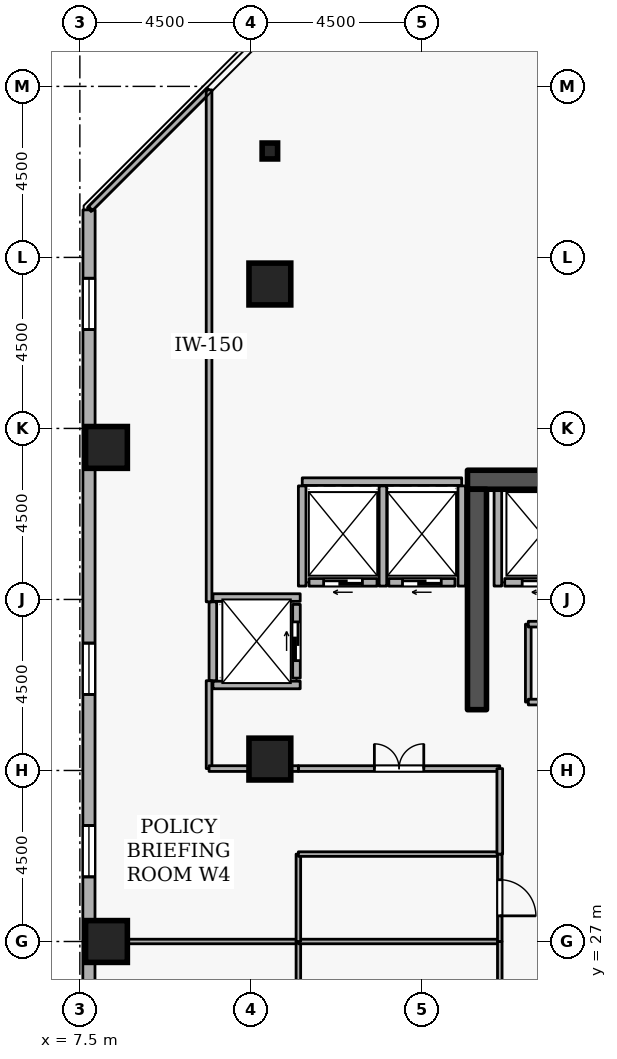
"""IFC4 building model, lengths in metres.
Left out: names, types, materials, properties, quantities, classifications, styles, units other than length and angle.
Written with IfcOpenShell. Run it as: python <this file> out.ifc"""

import sys

from ifc_helpers import new_model, si_unit, direction, frame, frame_2d, origin, origin_2d, place, context, subcontext, project, spatial, rectangle, i_section, extrude, element, fill, save


model = new_model("IFC4")
c1 = context("Model", 3, precision=1e-05, world=origin(), true_north=direction((0.0, 1.0)))
c2 = subcontext(c1, "Body", "Model", "MODEL_VIEW")
j1 = project(units=[si_unit("LENGTHUNIT", "METRE"), si_unit("PLANEANGLEUNIT", "RADIAN")], contexts=[c1])
p1 = place(None, origin())
s1 = spatial("IfcSite", under=j1, at=p1, CompositionType="ELEMENT")
p2 = place(p1, origin())
s2 = spatial("IfcBuilding", under=s1, at=p2, CompositionType="ELEMENT")
p3 = place(p2, frame((0.0, 0.0, 196.5)))
s3 = spatial("IfcBuildingStorey", under=s2, at=p3, CompositionType="ELEMENT", Elevation=196.5)
p4 = place(p3, frame((17.7, 39.15, 0.0), z_axis=(0.0, 0.0, 1.0), x_axis=(1.0, 0.0, 0.0)))
e1 = element("IfcWall", 1, at=p4, inside=s3, PredefinedType="SHEAR", context=c2, shape_type="SweptSolid", body=[
    extrude(rectangle(XDim=15.6, YDim=0.5, at=frame_2d((7.8, 0.0))), origin(), (0.0, 0.0, 1.0), 3.6),
])
p5 = place(p3, frame((17.95, 33.1, 0.0), z_axis=(0.0, 0.0, 1.0), x_axis=(0.0, 1.0, 0.0)))
e2 = element("IfcWall", 2, at=p5, inside=s3, PredefinedType="SHEAR", context=c2, shape_type="SweptSolid", body=[
    extrude(rectangle(XDim=5.8, YDim=0.5, at=frame_2d((2.9, 0.0))), origin(), (0.0, 0.0, 1.0), 3.6),
])
for number, where, z_axis, x_axis in (
    (3, (12.5, 44.3, 0.0), (0.0, 0.0, 1.0), (1.0, 0.0, 0.0)),
    (4, (8.2, 27.0, 0.0), (0.0, 0.0, 1.0), (1.0, 0.0, 0.0)),
    (5, (8.2, 40.0, 0.0), (0.0, 0.0, 1.0), (1.0, 0.0, 0.0)),
    (6, (12.5, 31.8, 0.0), (0.0, 0.0, 1.0), (1.0, 0.0, 0.0)),
):
    element("IfcColumn", number, at=place(p3, frame(where, z_axis=z_axis, x_axis=x_axis)), inside=s3, PredefinedType="COLUMN", context=c2, shape_type="SweptSolid", body=[
        extrude(rectangle(XDim=1.1, YDim=1.1, at=origin_2d()), origin(), (0.0, 0.0, 1.0), 3.6),
    ])
p6 = place(p3, frame((12.5, 47.8, 0.0), z_axis=(0.0, 0.0, 1.0), x_axis=(1.0, 0.0, 0.0)))
e7 = element("IfcColumn", 7, at=p6, inside=s3, PredefinedType="COLUMN", context=c2, shape_type="SweptSolid", body=[
    extrude(i_section(OverallWidth=0.407, OverallDepth=0.419, WebThickness=0.031, FlangeThickness=0.049, FilletRadius=0.015, at=origin_2d()), origin(), (0.0, 0.0, 1.0), 3.6),
])
p7 = place(p3, frame((7.742, 46.251, 0.0), z_axis=(0.0, 0.0, 1.0), x_axis=(-0.000184351399, -0.999999983007, 0.0)))
e8 = element("IfcWall", 8, at=p7, inside=s3, PredefinedType="STANDARD", context=c2, shape_type="SweptSolid", body=[
    extrude(rectangle(XDim=34.432, YDim=0.32, at=frame_2d((17.216, 0.0))), origin(), (0.0, 0.0, 1.0), 2.22),
])
p8 = place(p7, frame((1.8, 0.0, 0.72)))
e9 = element("IfcOpeningElement", 9, at=p8, cuts=e8, PredefinedType="OPENING", context=c2, shape_type="SweptSolid", body=[
    extrude(rectangle(XDim=1.35, YDim=1.05, at=frame_2d((0.675, 0.525))), frame((0.0, 0.17, 0.0), z_axis=(0.0, -1.0, 0.0), x_axis=(1.0, 0.0, 0.0)), (0.0, 0.0, 1.0), 0.34),
])
p9 = place(p7, frame((11.4, 0.0, 0.72)))
e10 = element("IfcOpeningElement", 10, at=p9, cuts=e8, PredefinedType="OPENING", context=c2, shape_type="SweptSolid", body=[
    extrude(rectangle(XDim=1.35, YDim=1.05, at=frame_2d((0.675, 0.525))), frame((0.0, 0.17, 0.0), z_axis=(0.0, -1.0, 0.0), x_axis=(1.0, 0.0, 0.0)), (0.0, 0.0, 1.0), 0.34),
])
p10 = place(p7, frame((16.2, 0.0, 0.72)))
e11 = element("IfcOpeningElement", 11, at=p10, cuts=e8, PredefinedType="OPENING", context=c2, shape_type="SweptSolid", body=[
    extrude(rectangle(XDim=1.35, YDim=1.05, at=frame_2d((0.675, 0.525))), frame((0.0, 0.17, 0.0), z_axis=(0.0, -1.0, 0.0), x_axis=(1.0, 0.0, 0.0)), (0.0, 0.0, 1.0), 0.34),
])
p11 = place(p7, frame((21.0, 0.0, 0.72)))
e12 = element("IfcOpeningElement", 12, at=p11, cuts=e8, PredefinedType="OPENING", context=c2, shape_type="SweptSolid", body=[
    extrude(rectangle(XDim=1.35, YDim=1.05, at=frame_2d((0.675, 0.525))), frame((0.0, 0.17, 0.0), z_axis=(0.0, -1.0, 0.0), x_axis=(1.0, 0.0, 0.0)), (0.0, 0.0, 1.0), 0.34),
])
p12 = place(p7, frame((25.8, 0.0, 0.72)))
e13 = element("IfcOpeningElement", 13, at=p12, cuts=e8, PredefinedType="OPENING", context=c2, shape_type="SweptSolid", body=[
    extrude(rectangle(XDim=1.35, YDim=1.05, at=frame_2d((0.675, 0.525))), frame((0.0, 0.17, 0.0), z_axis=(0.0, -1.0, 0.0), x_axis=(1.0, 0.0, 0.0)), (0.0, 0.0, 1.0), 0.34),
])
p13 = place(p3, frame((20.62, 36.45, 0.0), z_axis=(0.0, 0.0, 1.0), x_axis=(-1.0, 0.0, 0.0)))
e14 = element("IfcWall", 14, at=p13, inside=s3, PredefinedType="STANDARD", context=c2, shape_type="SweptSolid", body=[
    extrude(rectangle(XDim=1.94, YDim=0.2, at=frame_2d((0.97, 0.0))), origin(), (0.0, 0.0, 1.0), 3.32),
])
p14 = place(p13, frame((0.46, 0.0, 0.0)))
e15 = element("IfcOpeningElement", 15, at=p14, cuts=e14, PredefinedType="OPENING", context=c2, shape_type="SweptSolid", body=[
    extrude(rectangle(XDim=1.02, YDim=2.06, at=frame_2d((0.51, 1.03))), frame((0.0, 0.11, 0.0), z_axis=(0.0, -1.0, 0.0), x_axis=(1.0, 0.0, 0.0)), (0.0, 0.0, 1.0), 0.22),
])
p15 = place(p3, frame((17.37, 36.45, 0.0), z_axis=(0.0, 0.0, 1.0), x_axis=(-1.0, 0.0, 0.0)))
e16 = element("IfcWall", 16, at=p15, inside=s3, PredefinedType="STANDARD", context=c2, shape_type="SweptSolid", body=[
    extrude(rectangle(XDim=1.74, YDim=0.2, at=frame_2d((0.87, 0.0))), origin(), (0.0, 0.0, 1.0), 3.32),
])
p16 = place(p15, frame((0.36, 0.0, 0.0)))
e17 = element("IfcOpeningElement", 17, at=p16, cuts=e16, PredefinedType="OPENING", context=c2, shape_type="SweptSolid", body=[
    extrude(rectangle(XDim=1.02, YDim=2.06, at=frame_2d((0.51, 1.03))), frame((0.0, 0.11, 0.0), z_axis=(0.0, -1.0, 0.0), x_axis=(1.0, 0.0, 0.0)), (0.0, 0.0, 1.0), 0.22),
])
p17 = place(p3, frame((15.32, 36.45, 0.0), z_axis=(0.0, 0.0, 1.0), x_axis=(-1.0, 0.0, 0.0)))
e18 = element("IfcWall", 18, at=p17, inside=s3, PredefinedType="STANDARD", context=c2, shape_type="SweptSolid", body=[
    extrude(rectangle(XDim=1.79, YDim=0.2, at=frame_2d((0.895, 0.0))), origin(), (0.0, 0.0, 1.0), 3.32),
])
p18 = place(p17, frame((0.385, 0.0, 0.0)))
e19 = element("IfcOpeningElement", 19, at=p18, cuts=e18, PredefinedType="OPENING", context=c2, shape_type="SweptSolid", body=[
    extrude(rectangle(XDim=1.02, YDim=2.06, at=frame_2d((0.51, 1.03))), frame((0.0, 0.11, 0.0), z_axis=(0.0, -1.0, 0.0), x_axis=(1.0, 0.0, 0.0)), (0.0, 0.0, 1.0), 0.22),
])
p19 = place(p3, frame((13.2, 33.93, 0.0), z_axis=(0.0, 0.0, 1.0), x_axis=(0.0, 1.0, 0.0)))
e20 = element("IfcWall", 20, at=p19, inside=s3, PredefinedType="STANDARD", context=c2, shape_type="SweptSolid", body=[
    extrude(rectangle(XDim=1.94, YDim=0.2, at=frame_2d((0.97, 0.0))), origin(), (0.0, 0.0, 1.0), 3.32),
])
p20 = place(p19, frame((0.46, 0.0, 0.0)))
e21 = element("IfcOpeningElement", 21, at=p20, cuts=e20, PredefinedType="OPENING", context=c2, shape_type="SweptSolid", body=[
    extrude(rectangle(XDim=1.02, YDim=2.06, at=frame_2d((0.51, 1.03))), frame((0.0, 0.11, 0.0), z_axis=(0.0, -1.0, 0.0), x_axis=(1.0, 0.0, 0.0)), (0.0, 0.0, 1.0), 0.22),
])
p21 = place(p3, frame((18.5, 36.352, 0.0), z_axis=(0.0, 0.0, 1.0), x_axis=(0.0, 1.0, 0.0)))
e22 = element("IfcWall", 22, at=p21, inside=s3, PredefinedType="STANDARD", context=c2, shape_type="SweptSolid", body=[
    extrude(rectangle(XDim=2.536, YDim=0.2, at=frame_2d((1.268, 0.0))), origin(), (0.0, 0.0, 1.0), 3.32),
])
p22 = place(p3, frame((13.352, 39.1, 0.0), z_axis=(0.0, 0.0, 1.0), x_axis=(1.0, 0.0, 0.0)))
e23 = element("IfcWall", 23, at=p22, inside=s3, PredefinedType="STANDARD", context=c2, shape_type="SweptSolid", body=[
    extrude(rectangle(XDim=4.196, YDim=0.2, at=frame_2d((2.098, 0.0))), origin(), (0.0, 0.0, 1.0), 3.32),
])
p23 = place(p3, frame((17.55, 36.352, 0.0), z_axis=(0.0, 0.0, 1.0), x_axis=(0.0, 1.0, 0.0)))
e24 = element("IfcWall", 24, at=p23, inside=s3, PredefinedType="STANDARD", context=c2, shape_type="SweptSolid", body=[
    extrude(rectangle(XDim=2.636, YDim=0.2, at=frame_2d((1.318, 0.0))), origin(), (0.0, 0.0, 1.0), 2.525),
])
for number, where, z_axis, x_axis in (
    (25, (15.475, 36.352, 0.0), (0.0, 0.0, 1.0), (0.0, 1.0, 0.0)),
    (26, (13.35, 36.352, 0.0), (0.0, 0.0, 1.0), (0.0, 1.0, 0.0)),
):
    element("IfcWall", number, at=place(p3, frame(where, z_axis=z_axis, x_axis=x_axis)), inside=s3, PredefinedType="STANDARD", context=c2, shape_type="SweptSolid", body=[
        extrude(rectangle(XDim=2.636, YDim=0.2, at=frame_2d((1.318, 0.0))), origin(), (0.0, 0.0, 1.0), 3.32),
    ])
for number, where, z_axis, x_axis in (
    (27, (11.002, 36.05, 0.0), (0.0, 0.0, 1.0), (1.0, 0.0, 0.0)),
    (28, (11.002, 33.75, 0.0), (0.0, 0.0, 1.0), (1.0, 0.0, 0.0)),
):
    element("IfcWall", number, at=place(p3, frame(where, z_axis=z_axis, x_axis=x_axis)), inside=s3, PredefinedType="STANDARD", context=c2, shape_type="SweptSolid", body=[
        extrude(rectangle(XDim=2.296, YDim=0.2, at=frame_2d((1.148, 0.0))), origin(), (0.0, 0.0, 1.0), 3.32),
    ])
p24 = place(p3, frame((11.0, 33.862, 0.0), z_axis=(0.0, 0.0, 1.0), x_axis=(0.0, 1.0, 0.0)))
e29 = element("IfcWall", 29, at=p24, inside=s3, PredefinedType="STANDARD", context=c2, shape_type="SweptSolid", body=[
    extrude(rectangle(XDim=2.076, YDim=0.2, at=frame_2d((1.038, 0.0))), origin(), (0.0, 0.0, 1.0), 3.32),
])
p25 = place(p3, frame((19.3, 33.3, 0.0), z_axis=(0.0, 0.0, 1.0), x_axis=(0.0, 1.0, 0.0)))
e30 = element("IfcWall", 30, at=p25, inside=s3, PredefinedType="PARTITIONING", context=c2, shape_type="SweptSolid", body=[
    extrude(rectangle(XDim=2.05, YDim=0.15, at=frame_2d((1.025, 0.0))), origin(), (0.0, 0.0, 1.0), 3.32),
])
p26 = place(p3, frame((19.3, 35.35, 0.0), z_axis=(0.0, 0.0, 1.0), x_axis=(1.0, 0.0, 0.0)))
e31 = element("IfcWall", 31, at=p26, inside=s3, PredefinedType="PARTITIONING", context=c2, shape_type="SweptSolid", body=[
    extrude(rectangle(XDim=3.25, YDim=0.15, at=frame_2d((1.625, 0.0))), origin(), (0.0, 0.0, 1.0), 3.32),
])
p27 = place(p3, frame((22.55, 33.3, 0.0), z_axis=(0.0, 0.0, 1.0), x_axis=(-1.0, 0.0, 0.0)))
e32 = element("IfcWall", 32, at=p27, inside=s3, PredefinedType="PARTITIONING", context=c2, shape_type="SweptSolid", body=[
    extrude(rectangle(XDim=3.25, YDim=0.15, at=frame_2d((1.625, 0.0))), origin(), (0.0, 0.0, 1.0), 3.32),
])
p28 = place(p27, frame((1.165, 0.0, 0.0)))
e33 = element("IfcOpeningElement", 33, at=p28, cuts=e32, PredefinedType="OPENING", context=c2, shape_type="SweptSolid", body=[
    extrude(rectangle(XDim=0.92, YDim=2.08, at=frame_2d((0.46, 1.04))), frame((0.0, 0.085, 0.0), z_axis=(0.0, -1.0, 0.0), x_axis=(1.0, 0.0, 0.0)), (0.0, 0.0, 1.0), 0.17),
])
p29 = place(p3, frame((7.78, 27.0, 0.0), z_axis=(0.0, 0.0, 1.0), x_axis=(1.0, 0.0, 0.0)))
e34 = element("IfcWall", 34, at=p29, inside=s3, PredefinedType="PARTITIONING", context=c2, shape_type="SweptSolid", body=[
    extrude(rectangle(XDim=5.47, YDim=0.12, at=frame_2d((2.735, 0.0))), origin(), (0.0, 0.0, 1.0), 1.785),
])
p30 = place(p3, frame((13.25, 27.0, 0.0), z_axis=(0.0, 0.0, 1.0), x_axis=(0.0, -1.0, 0.0)))
e35 = element("IfcWall", 35, at=p30, inside=s3, PredefinedType="PARTITIONING", context=c2, shape_type="SweptSolid", body=[
    extrude(rectangle(XDim=4.55, YDim=0.12, at=frame_2d((2.275, 0.0))), origin(), (0.0, 0.0, 1.0), 3.32),
])
p31 = place(p3, frame((13.25, 27.0, 0.0), z_axis=(0.0, 0.0, 1.0), x_axis=(1.0, 0.0, 0.0)))
e36 = element("IfcWall", 36, at=p31, inside=s3, PredefinedType="PARTITIONING", context=c2, shape_type="SweptSolid", body=[
    extrude(rectangle(XDim=5.3, YDim=0.12, at=frame_2d((2.65, 0.0))), origin(), (0.0, 0.0, 1.0), 1.785),
])
p32 = place(p3, frame((18.55, 27.0, 0.0), z_axis=(0.0, 0.0, 1.0), x_axis=(0.0, -1.0, 0.0)))
e37 = element("IfcWall", 37, at=p32, inside=s3, PredefinedType="PARTITIONING", context=c2, shape_type="SweptSolid", body=[
    extrude(rectangle(XDim=4.55, YDim=0.12, at=frame_2d((2.275, 0.0))), origin(), (0.0, 0.0, 1.0), 3.32),
])
p33 = place(p3, frame((13.25, 27.0, 0.0), z_axis=(0.0, 0.0, 1.0), x_axis=(0.0, 1.0, 0.0)))
e38 = element("IfcWall", 38, at=p33, inside=s3, PredefinedType="PARTITIONING", context=c2, shape_type="SweptSolid", body=[
    extrude(rectangle(XDim=2.3, YDim=0.12, at=frame_2d((1.15, 0.0))), origin(), (0.0, 0.0, 1.0), 3.32),
])
p34 = place(p3, frame((13.25, 29.3, 0.0), z_axis=(0.0, 0.0, 1.0), x_axis=(1.0, 0.0, 0.0)))
e39 = element("IfcWall", 39, at=p34, inside=s3, PredefinedType="PARTITIONING", context=c2, shape_type="SweptSolid", body=[
    extrude(rectangle(XDim=5.3, YDim=0.12, at=frame_2d((2.65, 0.0))), origin(), (0.0, 0.0, 1.0), 3.32),
])
p35 = place(p3, frame((18.55, 29.3, 0.0), z_axis=(0.0, 0.0, 1.0), x_axis=(0.0, -1.0, 0.0)))
e40 = element("IfcWall", 40, at=p35, inside=s3, PredefinedType="PARTITIONING", context=c2, shape_type="SweptSolid", body=[
    extrude(rectangle(XDim=2.3, YDim=0.12, at=frame_2d((1.15, 0.0))), origin(), (0.0, 0.0, 1.0), 3.32),
])
p36 = place(p35, frame((0.675, 0.0, 0.0)))
e41 = element("IfcOpeningElement", 41, at=p36, cuts=e40, PredefinedType="OPENING", context=c2, shape_type="SweptSolid", body=[
    extrude(rectangle(XDim=0.95, YDim=2.1, at=frame_2d((0.475, 1.05))), frame((0.0, 0.07, 0.0), z_axis=(0.0, -1.0, 0.0), x_axis=(1.0, 0.0, 0.0)), (0.0, 0.0, 1.0), 0.14),
])
p37 = place(p3, frame((13.25, 31.55, 0.0), z_axis=(0.0, 0.0, 1.0), x_axis=(1.0, 0.0, 0.0)))
e42 = element("IfcWall", 42, at=p37, inside=s3, PredefinedType="PARTITIONING", context=c2, shape_type="SweptSolid", body=[
    extrude(rectangle(XDim=5.3, YDim=0.15, at=frame_2d((2.65, 0.0))), origin(), (0.0, 0.0, 1.0), 3.32),
])
p38 = place(p37, frame((2.0, 0.0, 0.0)))
e43 = element("IfcOpeningElement", 43, at=p38, cuts=e42, PredefinedType="OPENING", context=c2, shape_type="SweptSolid", body=[
    extrude(rectangle(XDim=1.3, YDim=2.12, at=frame_2d((0.65, 1.06))), frame((0.0, 0.085, 0.0), z_axis=(0.0, -1.0, 0.0), x_axis=(1.0, 0.0, 0.0)), (0.0, 0.0, 1.0), 0.17),
])
p39 = place(p3, frame((18.55, 31.55, 0.0), z_axis=(0.0, 0.0, 1.0), x_axis=(0.0, -1.0, 0.0)))
e44 = element("IfcWall", 44, at=p39, inside=s3, PredefinedType="PARTITIONING", context=c2, shape_type="SweptSolid", body=[
    extrude(rectangle(XDim=2.25, YDim=0.15, at=frame_2d((1.125, 0.0))), origin(), (0.0, 0.0, 1.0), 3.32),
])
p40 = place(p3, frame((7.78, 46.287, 0.0), z_axis=(0.0, 0.0, 1.0), x_axis=(0.707079114978, 0.707134446312, 0.0)))
e45 = element("IfcWall", 45, at=p40, inside=s3, PredefinedType="PARTITIONING", context=c2, shape_type="SweptSolid", body=[
    extrude(rectangle(XDim=4.412, YDim=0.15, at=frame_2d((2.206, 0.0))), origin(), (0.0, 0.0, 1.0), 3.32),
])
p41 = place(p3, frame((10.9, 49.407, 0.0), z_axis=(0.0, 0.0, 1.0), x_axis=(0.0, -1.0, 0.0)))
e46 = element("IfcWall", 46, at=p41, inside=s3, PredefinedType="PARTITIONING", context=c2, shape_type="SweptSolid", body=[
    extrude(rectangle(XDim=13.469, YDim=0.15, at=frame_2d((6.735, 0.0))), origin(), (0.0, 0.0, 1.0), 3.32),
])
p42 = place(p3, frame((10.9, 33.862, 0.0), z_axis=(0.0, 0.0, 1.0), x_axis=(0.0, -1.0, 0.0)))
e47 = element("IfcWall", 47, at=p42, inside=s3, PredefinedType="PARTITIONING", context=c2, shape_type="SweptSolid", body=[
    extrude(rectangle(XDim=2.312, YDim=0.15, at=frame_2d((1.156, 0.0))), origin(), (0.0, 0.0, 1.0), 3.32),
])
p43 = place(p3, frame((10.9, 31.55, 0.0), z_axis=(0.0, 0.0, 1.0), x_axis=(1.0, 0.0, 0.0)))
e48 = element("IfcWall", 48, at=p43, inside=s3, PredefinedType="PARTITIONING", context=c2, shape_type="SweptSolid", body=[
    extrude(rectangle(XDim=2.35, YDim=0.15, at=frame_2d((1.175, 0.0))), origin(), (0.0, 0.0, 1.0), 3.32),
])
p44 = place(p8, origin())
e49 = element("IfcWindow", 49, at=p44, inside=s3, PartitioningType="SINGLE_PANEL", PredefinedType="WINDOW", context=c2, shape_type="SweptSolid", body=[
    extrude(rectangle(XDim=1.35, YDim=1.05, at=frame_2d((0.675, 0.525))), frame((0.0, 0.03, 0.0), z_axis=(0.0, -1.0, 0.0), x_axis=(1.0, 0.0, 0.0)), (0.0, 0.0, 1.0), 0.06),
])
fill(e9, e49)
p45 = place(p9, origin())
e50 = element("IfcWindow", 50, at=p45, inside=s3, PartitioningType="SINGLE_PANEL", PredefinedType="WINDOW", context=c2, shape_type="SweptSolid", body=[
    extrude(rectangle(XDim=1.35, YDim=1.05, at=frame_2d((0.675, 0.525))), frame((0.0, 0.03, 0.0), z_axis=(0.0, -1.0, 0.0), x_axis=(1.0, 0.0, 0.0)), (0.0, 0.0, 1.0), 0.06),
])
fill(e10, e50)
p46 = place(p10, origin())
e51 = element("IfcWindow", 51, at=p46, inside=s3, PartitioningType="SINGLE_PANEL", PredefinedType="WINDOW", context=c2, shape_type="SweptSolid", body=[
    extrude(rectangle(XDim=1.35, YDim=1.05, at=frame_2d((0.675, 0.525))), frame((0.0, 0.03, 0.0), z_axis=(0.0, -1.0, 0.0), x_axis=(1.0, 0.0, 0.0)), (0.0, 0.0, 1.0), 0.06),
])
fill(e11, e51)
p47 = place(p14, origin())
e52 = element("IfcDoor", 52, at=p47, inside=s3, OperationType="SLIDING_TO_LEFT", PredefinedType="DOOR", context=c2, shape_type="SweptSolid", body=[
    extrude(rectangle(XDim=1.02, YDim=2.06, at=frame_2d((0.51, 1.03))), frame((0.0, 0.025, 0.0), z_axis=(0.0, -1.0, 0.0), x_axis=(1.0, 0.0, 0.0)), (0.0, 0.0, 1.0), 0.05),
])
fill(e15, e52)
p48 = place(p16, origin())
e53 = element("IfcDoor", 53, at=p48, inside=s3, OperationType="SLIDING_TO_LEFT", PredefinedType="DOOR", context=c2, shape_type="SweptSolid", body=[
    extrude(rectangle(XDim=1.02, YDim=2.06, at=frame_2d((0.51, 1.03))), frame((0.0, 0.025, 0.0), z_axis=(0.0, -1.0, 0.0), x_axis=(1.0, 0.0, 0.0)), (0.0, 0.0, 1.0), 0.05),
])
fill(e17, e53)
p49 = place(p18, origin())
e54 = element("IfcDoor", 54, at=p49, inside=s3, OperationType="SLIDING_TO_LEFT", PredefinedType="DOOR", context=c2, shape_type="SweptSolid", body=[
    extrude(rectangle(XDim=1.02, YDim=2.06, at=frame_2d((0.51, 1.03))), frame((0.0, 0.025, 0.0), z_axis=(0.0, -1.0, 0.0), x_axis=(1.0, 0.0, 0.0)), (0.0, 0.0, 1.0), 0.05),
])
fill(e19, e54)
p50 = place(p20, origin())
e55 = element("IfcDoor", 55, at=p50, inside=s3, OperationType="SLIDING_TO_LEFT", PredefinedType="DOOR", context=c2, shape_type="SweptSolid", body=[
    extrude(rectangle(XDim=1.02, YDim=2.06, at=frame_2d((0.51, 1.03))), frame((0.0, 0.025, 0.0), z_axis=(0.0, -1.0, 0.0), x_axis=(1.0, 0.0, 0.0)), (0.0, 0.0, 1.0), 0.05),
])
fill(e21, e55)
p51 = place(p36, origin())
e56 = element("IfcDoor", 56, at=p51, inside=s3, OperationType="SINGLE_SWING_RIGHT", PredefinedType="DOOR", context=c2, shape_type="SweptSolid", body=[
    extrude(rectangle(XDim=0.95, YDim=2.1, at=frame_2d((0.475, 1.05))), frame((0.0, 0.025, 0.0), z_axis=(0.0, -1.0, 0.0), x_axis=(1.0, 0.0, 0.0)), (0.0, 0.0, 1.0), 0.05),
])
fill(e41, e56)
p52 = place(p38, origin())
e57 = element("IfcDoor", 57, at=p52, inside=s3, OperationType="DOUBLE_DOOR_SINGLE_SWING", PredefinedType="DOOR", context=c2, shape_type="SweptSolid", body=[
    extrude(rectangle(XDim=1.3, YDim=2.12, at=frame_2d((0.65, 1.06))), frame((0.0, 0.025, 0.0), z_axis=(0.0, -1.0, 0.0), x_axis=(1.0, 0.0, 0.0)), (0.0, 0.0, 1.0), 0.05),
])
fill(e43, e57)
save(model, sys.argv[1])
